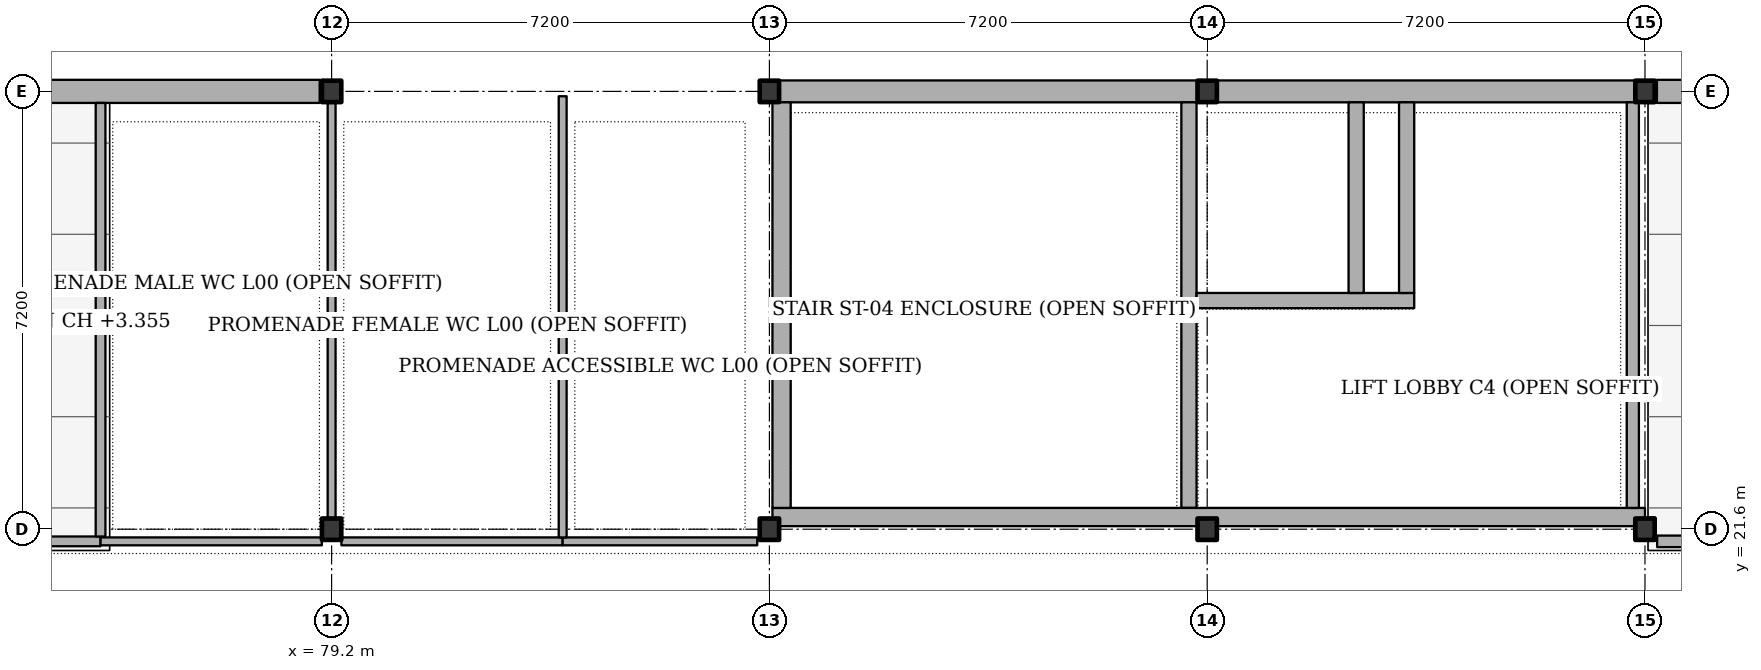
"""IFC4 building model, lengths in metres.
Left out: names, types, materials, properties, quantities, classifications, styles, units other than length and angle.
Written with IfcOpenShell. Run it as: python <this file> out.ifc"""

import sys

from ifc_helpers import new_model, si_unit, direction, frame, frame_2d, origin, origin_2d, place, context, subcontext, project, spatial, rectangle, i_section, extrude, element, fill, save


model = new_model("IFC4")
c1 = context("Model", 3, precision=1e-05, world=origin(), true_north=direction((0.0, 1.0)))
c2 = subcontext(c1, "Body", "Model", "MODEL_VIEW")
j1 = project(units=[si_unit("LENGTHUNIT", "METRE"), si_unit("PLANEANGLEUNIT", "RADIAN")], contexts=[c1])
p1 = place(None, origin())
s1 = spatial("IfcSite", under=j1, at=p1, CompositionType="ELEMENT")
p2 = place(p1, origin())
s2 = spatial("IfcBuilding", under=s1, at=p2, CompositionType="ELEMENT")
p3 = place(p2, origin())
s3 = spatial("IfcBuildingStorey", under=s2, at=p3, CompositionType="ELEMENT", Elevation=0.0)
for number, where, z_axis, x_axis in (
    (1, (79.2, 21.6, -0.3), (0.0, 0.0, 1.0), (1.0, 0.0, 0.0)),
    (2, (79.2, 28.8, -0.3), (0.0, 0.0, 1.0), (1.0, 0.0, 0.0)),
    (3, (86.4, 21.6, -0.3), (0.0, 0.0, 1.0), (1.0, 0.0, 0.0)),
    (4, (86.4, 28.8, -0.3), (0.0, 0.0, 1.0), (1.0, 0.0, 0.0)),
    (5, (93.6, 21.6, -0.3), (0.0, 0.0, 1.0), (1.0, 0.0, 0.0)),
    (6, (93.6, 28.8, -0.3), (0.0, 0.0, 1.0), (1.0, 0.0, 0.0)),
    (7, (100.8, 21.6, -0.3), (0.0, 0.0, 1.0), (1.0, 0.0, 0.0)),
    (8, (100.8, 28.8, -0.3), (0.0, 0.0, 1.0), (1.0, 0.0, 0.0)),
):
    element("IfcColumn", number, at=place(p3, frame(where, z_axis=z_axis, x_axis=x_axis)), inside=s3, PredefinedType="COLUMN", context=c2, shape_type="SweptSolid", body=[
        extrude(i_section(OverallWidth=0.318, OverallDepth=0.353, WebThickness=0.023, FlangeThickness=0.038, FilletRadius=0.015, at=origin_2d()), origin(), (0.0, 0.0, 1.0), 5.7),
    ])
p4 = place(p3, frame((72.196, 28.8, 0.0), z_axis=(0.0, 0.0, 1.0), x_axis=(1.0, 0.0, 0.0)))
e9 = element("IfcWall", 9, at=p4, inside=s3, PredefinedType="SOLIDWALL", context=c2, shape_type="SweptSolid", body=[
    extrude(rectangle(XDim=6.807, YDim=0.38, at=frame_2d((3.404, 0.0))), origin(), (0.0, 0.0, 1.0), 4.304),
])
p5 = place(p3, frame((86.4, 28.8, 0.0), z_axis=(0.0, 0.0, 1.0), x_axis=(1.0, 0.0, 0.0)))
e10 = element("IfcWall", 10, at=p5, inside=s3, PredefinedType="SHEAR", context=c2, shape_type="SweptSolid", body=[
    extrude(rectangle(XDim=7.2, YDim=0.36, at=frame_2d((3.6, 0.0))), origin(), (0.0, 0.0, 1.0), 4.505),
])
p6 = place(p5, frame((2.85, 0.0, 0.0)))
e11 = element("IfcOpeningElement", 11, at=p6, cuts=e10, PredefinedType="OPENING", context=c2, shape_type="SweptSolid", body=[
    extrude(rectangle(XDim=1.5, YDim=2.15, at=frame_2d((0.75, 1.075))), frame((0.0, 0.19, 0.0), z_axis=(0.0, -1.0, 0.0), x_axis=(1.0, 0.0, 0.0)), (0.0, 0.0, 1.0), 0.38),
])
p7 = place(p3, frame((93.6, 28.8, 0.0), z_axis=(0.0, 0.0, 1.0), x_axis=(1.0, 0.0, 0.0)))
e12 = element("IfcWall", 12, at=p7, inside=s3, PredefinedType="SHEAR", context=c2, shape_type="SweptSolid", body=[
    extrude(rectangle(XDim=7.2, YDim=0.36, at=frame_2d((3.6, 0.0))), origin(), (0.0, 0.0, 1.0), 4.355),
])
p8 = place(p3, frame((100.996, 28.8, 0.0), z_axis=(0.0, 0.0, 1.0), x_axis=(1.0, 0.0, 0.0)))
e13 = element("IfcWall", 13, at=p8, inside=s3, PredefinedType="SOLIDWALL", context=c2, shape_type="SweptSolid", body=[
    extrude(rectangle(XDim=6.807, YDim=0.38, at=frame_2d((3.404, 0.0))), origin(), (0.0, 0.0, 1.0), 4.355),
])
p9 = place(p8, frame((2.079, 0.0, 1.05)))
e14 = element("IfcOpeningElement", 14, at=p9, cuts=e13, PredefinedType="OPENING", context=c2, shape_type="SweptSolid", body=[
    extrude(rectangle(XDim=2.65, YDim=1.6, at=frame_2d((1.325, 0.8))), frame((0.0, 0.2, 0.0), z_axis=(0.0, -1.0, 0.0), x_axis=(1.0, 0.0, 0.0)), (0.0, 0.0, 1.0), 0.4),
])
p10 = place(p3, frame((93.3, 21.95, 0.0), z_axis=(0.0, 0.0, 1.0), x_axis=(0.0, 1.0, 0.0)))
e15 = element("IfcWall", 15, at=p10, inside=s3, PredefinedType="SHEAR", context=c2, shape_type="SweptSolid", body=[
    extrude(rectangle(XDim=6.67, YDim=0.25, at=frame_2d((3.335, 0.0))), origin(), (0.0, 0.0, 1.0), 4.45),
])
p11 = place(p10, frame((0.95, 0.0, 0.0)))
e16 = element("IfcOpeningElement", 16, at=p11, cuts=e15, PredefinedType="OPENING", context=c2, shape_type="SweptSolid", body=[
    extrude(rectangle(XDim=1.35, YDim=2.15, at=frame_2d((0.675, 1.075))), frame((0.0, 0.135, 0.0), z_axis=(0.0, -1.0, 0.0), x_axis=(1.0, 0.0, 0.0)), (0.0, 0.0, 1.0), 0.27),
])
p12 = place(p3, frame((93.425, 25.36, 0.0), z_axis=(0.0, 0.0, 1.0), x_axis=(1.0, 0.0, 0.0)))
e17 = element("IfcWall", 17, at=p12, inside=s3, PredefinedType="SHEAR", context=c2, shape_type="SweptSolid", body=[
    extrude(rectangle(XDim=3.58, YDim=0.25, at=frame_2d((1.79, 0.0))), origin(), (0.0, 0.0, 1.0), 4.45),
])
p13 = place(p12, frame((0.775, 0.0, 0.0)))
e18 = element("IfcOpeningElement", 18, at=p13, cuts=e17, PredefinedType="OPENING", context=c2, shape_type="SweptSolid", body=[
    extrude(rectangle(XDim=1.1, YDim=2.15, at=frame_2d((0.55, 1.075))), frame((0.0, 0.135, 0.0), z_axis=(0.0, -1.0, 0.0), x_axis=(1.0, 0.0, 0.0)), (0.0, 0.0, 1.0), 0.27),
])
p14 = place(p3, frame((96.05, 25.485, 0.0), z_axis=(0.0, 0.0, 1.0), x_axis=(0.0, 1.0, 0.0)))
e19 = element("IfcWall", 19, at=p14, inside=s3, PredefinedType="SHEAR", context=c2, shape_type="SweptSolid", body=[
    extrude(rectangle(XDim=3.135, YDim=0.25, at=frame_2d((1.567, 0.0))), origin(), (0.0, 0.0, 1.0), 4.45),
])
p15 = place(p3, frame((96.88, 25.485, 0.0), z_axis=(0.0, 0.0, 1.0), x_axis=(0.0, 1.0, 0.0)))
e20 = element("IfcWall", 20, at=p15, inside=s3, PredefinedType="SHEAR", context=c2, shape_type="SweptSolid", body=[
    extrude(rectangle(XDim=3.135, YDim=0.25, at=frame_2d((1.567, 0.0))), origin(), (0.0, 0.0, 1.0), 4.45),
])
p16 = place(p15, frame((0.9, 0.0, 0.0)))
e21 = element("IfcOpeningElement", 21, at=p16, cuts=e20, PredefinedType="OPENING", context=c2, shape_type="SweptSolid", body=[
    extrude(rectangle(XDim=0.92, YDim=2.05, at=frame_2d((0.46, 1.025))), frame((0.0, 0.135, 0.0), z_axis=(0.0, -1.0, 0.0), x_axis=(1.0, 0.0, 0.0)), (0.0, 0.0, 1.0), 0.27),
])
p17 = place(p3, frame((86.45, 21.8, 0.0), z_axis=(0.0, 0.0, 1.0), x_axis=(1.0, 0.0, 0.0)))
e22 = element("IfcWall", 22, at=p17, inside=s3, PredefinedType="SHEAR", context=c2, shape_type="SweptSolid", body=[
    extrude(rectangle(XDim=14.35, YDim=0.3, at=frame_2d((7.175, 0.0))), origin(), (0.0, 0.0, 1.0), 4.45),
])
p18 = place(p17, frame((11.5, 0.0, 0.0)))
e23 = element("IfcOpeningElement", 23, at=p18, cuts=e22, PredefinedType="OPENING", context=c2, shape_type="SweptSolid", body=[
    extrude(rectangle(XDim=1.5, YDim=2.15, at=frame_2d((0.75, 1.075))), frame((0.0, 0.16, 0.0), z_axis=(0.0, -1.0, 0.0), x_axis=(1.0, 0.0, 0.0)), (0.0, 0.0, 1.0), 0.32),
])
p19 = place(p3, frame((86.6, 21.95, 0.0), z_axis=(0.0, 0.0, 1.0), x_axis=(0.0, 1.0, 0.0)))
e24 = element("IfcWall", 24, at=p19, inside=s3, PredefinedType="SHEAR", context=c2, shape_type="SweptSolid", body=[
    extrude(rectangle(XDim=6.67, YDim=0.3, at=frame_2d((3.335, 0.0))), origin(), (0.0, 0.0, 1.0), 4.45),
])
p20 = place(p3, frame((100.6, 21.95, 0.0), z_axis=(0.0, 0.0, 1.0), x_axis=(0.0, 1.0, 0.0)))
e25 = element("IfcWall", 25, at=p20, inside=s3, PredefinedType="SOLIDWALL", context=c2, shape_type="SweptSolid", body=[
    extrude(rectangle(XDim=6.67, YDim=0.2, at=frame_2d((3.335, 0.0))), origin(), (0.0, 0.0, 1.0), 4.35),
])
p21 = place(p3, frame((72.161, 21.4, 0.0), z_axis=(0.0, 0.0, 1.0), x_axis=(1.0, 0.0, 0.0)))
e26 = element("IfcWall", 26, at=p21, inside=s3, PredefinedType="PARTITIONING", context=c2, shape_type="SweptSolid", body=[
    extrude(rectangle(XDim=3.239, YDim=0.16, at=frame_2d((1.62, 0.0))), origin(), (0.0, 0.0, 1.0), 3.55),
])
p22 = place(p3, frame((75.4, 21.4, 0.0), z_axis=(0.0, 0.0, 1.0), x_axis=(1.0, 0.0, 0.0)))
e27 = element("IfcWall", 27, at=p22, inside=s3, PredefinedType="PARTITIONING", context=c2, shape_type="SweptSolid", body=[
    extrude(rectangle(XDim=3.639, YDim=0.13, at=frame_2d((1.82, 0.0))), origin(), (0.0, 0.0, 1.0), 3.55),
])
p23 = place(p22, frame((0.32, 0.0, 0.0)))
e28 = element("IfcOpeningElement", 28, at=p23, cuts=e27, PredefinedType="OPENING", context=c2, shape_type="SweptSolid", body=[
    extrude(rectangle(XDim=0.9, YDim=2.05, at=frame_2d((0.45, 1.025))), frame((0.0, 0.075, 0.0), z_axis=(0.0, -1.0, 0.0), x_axis=(1.0, 0.0, 0.0)), (0.0, 0.0, 1.0), 0.15),
])
p24 = place(p3, frame((79.361, 21.4, 0.0), z_axis=(0.0, 0.0, 1.0), x_axis=(1.0, 0.0, 0.0)))
e29 = element("IfcWall", 29, at=p24, inside=s3, PredefinedType="PARTITIONING", context=c2, shape_type="SweptSolid", body=[
    extrude(rectangle(XDim=3.639, YDim=0.13, at=frame_2d((1.819, 0.0))), origin(), (0.0, 0.0, 1.0), 3.55),
])
p25 = place(p24, frame((2.419, 0.0, 0.0)))
e30 = element("IfcOpeningElement", 30, at=p25, cuts=e29, PredefinedType="OPENING", context=c2, shape_type="SweptSolid", body=[
    extrude(rectangle(XDim=0.9, YDim=2.05, at=frame_2d((0.45, 1.025))), frame((0.0, 0.075, 0.0), z_axis=(0.0, -1.0, 0.0), x_axis=(1.0, 0.0, 0.0)), (0.0, 0.0, 1.0), 0.15),
])
p26 = place(p3, frame((83.0, 21.4, 0.0), z_axis=(0.0, 0.0, 1.0), x_axis=(1.0, 0.0, 0.0)))
e31 = element("IfcWall", 31, at=p26, inside=s3, PredefinedType="PARTITIONING", context=c2, shape_type="SweptSolid", body=[
    extrude(rectangle(XDim=3.2, YDim=0.13, at=frame_2d((1.6, 0.0))), origin(), (0.0, 0.0, 1.0), 3.55),
])
p27 = place(p26, frame((0.32, 0.0, 0.0)))
e32 = element("IfcOpeningElement", 32, at=p27, cuts=e31, PredefinedType="OPENING", context=c2, shape_type="SweptSolid", body=[
    extrude(rectangle(XDim=0.98, YDim=2.1, at=frame_2d((0.49, 1.05))), frame((0.0, 0.075, 0.0), z_axis=(0.0, -1.0, 0.0), x_axis=(1.0, 0.0, 0.0)), (0.0, 0.0, 1.0), 0.15),
])
p28 = place(p3, frame((101.0, 21.4, 0.0), z_axis=(0.0, 0.0, 1.0), x_axis=(1.0, 0.0, 0.0)))
e33 = element("IfcWall", 33, at=p28, inside=s3, PredefinedType="PARTITIONING", context=c2, shape_type="SweptSolid", body=[
    extrude(rectangle(XDim=6.839, YDim=0.19, at=frame_2d((3.419, 0.0))), origin(), (0.0, 0.0, 1.0), 3.55),
])
p29 = place(p3, frame((75.4, 21.48, 0.0), z_axis=(0.0, 0.0, 1.0), x_axis=(0.0, 1.0, 0.0)))
e34 = element("IfcWall", 34, at=p29, inside=s3, PredefinedType="PARTITIONING", context=c2, shape_type="SweptSolid", body=[
    extrude(rectangle(XDim=7.13, YDim=0.16, at=frame_2d((3.565, 0.0))), origin(), (0.0, 0.0, 1.0), 3.55),
])
p30 = place(p3, frame((79.2, 21.778, 0.0), z_axis=(0.0, 0.0, 1.0), x_axis=(0.0, 1.0, 0.0)))
e35 = element("IfcWall", 35, at=p30, inside=s3, PredefinedType="PARTITIONING", context=c2, shape_type="SweptSolid", body=[
    extrude(rectangle(XDim=6.832, YDim=0.13, at=frame_2d((3.416, 0.0))), origin(), (0.0, 0.0, 1.0), 3.55),
])
p31 = place(p3, frame((83.0, 21.465, 0.0), z_axis=(0.0, 0.0, 1.0), x_axis=(0.0, 1.0, 0.0)))
e36 = element("IfcWall", 36, at=p31, inside=s3, PredefinedType="PARTITIONING", context=c2, shape_type="SweptSolid", body=[
    extrude(rectangle(XDim=7.255, YDim=0.13, at=frame_2d((3.627, 0.0))), origin(), (0.0, 0.0, 1.0), 3.55),
])
p32 = place(p6, origin())
e37 = element("IfcDoor", 37, at=p32, inside=s3, OperationType="SINGLE_SWING_RIGHT", PredefinedType="DOOR", context=c2, shape_type="SweptSolid", body=[
    extrude(rectangle(XDim=1.5, YDim=2.15, at=frame_2d((0.75, 1.075))), frame((0.0, 0.025, 0.0), z_axis=(0.0, -1.0, 0.0), x_axis=(1.0, 0.0, 0.0)), (0.0, 0.0, 1.0), 0.05),
])
fill(e11, e37)
p33 = place(p11, origin())
e38 = element("IfcDoor", 38, at=p33, inside=s3, OperationType="SINGLE_SWING_RIGHT", PredefinedType="DOOR", context=c2, shape_type="SweptSolid", body=[
    extrude(rectangle(XDim=1.35, YDim=2.15, at=frame_2d((0.675, 1.075))), frame((0.0, 0.025, 0.0), z_axis=(0.0, -1.0, 0.0), x_axis=(1.0, 0.0, 0.0)), (0.0, 0.0, 1.0), 0.05),
])
fill(e16, e38)
p34 = place(p13, origin())
e39 = element("IfcDoor", 39, at=p34, inside=s3, OperationType="SLIDING_TO_LEFT", PredefinedType="DOOR", context=c2, shape_type="SweptSolid", body=[
    extrude(rectangle(XDim=1.1, YDim=2.15, at=frame_2d((0.55, 1.075))), frame((0.0, 0.025, 0.0), z_axis=(0.0, -1.0, 0.0), x_axis=(1.0, 0.0, 0.0)), (0.0, 0.0, 1.0), 0.05),
])
fill(e18, e39)
p35 = place(p16, origin())
e40 = element("IfcDoor", 40, at=p35, inside=s3, OperationType="SINGLE_SWING_LEFT", PredefinedType="DOOR", context=c2, shape_type="SweptSolid", body=[
    extrude(rectangle(XDim=0.92, YDim=2.05, at=frame_2d((0.46, 1.025))), frame((0.0, 0.025, 0.0), z_axis=(0.0, -1.0, 0.0), x_axis=(1.0, 0.0, 0.0)), (0.0, 0.0, 1.0), 0.05),
])
fill(e21, e40)
p36 = place(p18, origin())
e41 = element("IfcDoor", 41, at=p36, inside=s3, OperationType="SINGLE_SWING_RIGHT", PredefinedType="DOOR", context=c2, shape_type="SweptSolid", body=[
    extrude(rectangle(XDim=1.5, YDim=2.15, at=frame_2d((0.75, 1.075))), frame((0.0, 0.025, 0.0), z_axis=(0.0, -1.0, 0.0), x_axis=(1.0, 0.0, 0.0)), (0.0, 0.0, 1.0), 0.05),
])
fill(e23, e41)
p37 = place(p23, origin())
e42 = element("IfcDoor", 42, at=p37, inside=s3, OperationType="SINGLE_SWING_LEFT", PredefinedType="DOOR", context=c2, shape_type="SweptSolid", body=[
    extrude(rectangle(XDim=0.9, YDim=2.05, at=frame_2d((0.45, 1.025))), frame((0.0, 0.025, 0.0), z_axis=(0.0, -1.0, 0.0), x_axis=(1.0, 0.0, 0.0)), (0.0, 0.0, 1.0), 0.05),
])
fill(e28, e42)
p38 = place(p25, origin())
e43 = element("IfcDoor", 43, at=p38, inside=s3, OperationType="SINGLE_SWING_RIGHT", PredefinedType="DOOR", context=c2, shape_type="SweptSolid", body=[
    extrude(rectangle(XDim=0.9, YDim=2.05, at=frame_2d((0.45, 1.025))), frame((0.0, 0.025, 0.0), z_axis=(0.0, -1.0, 0.0), x_axis=(1.0, 0.0, 0.0)), (0.0, 0.0, 1.0), 0.05),
])
fill(e30, e43)
p39 = place(p27, origin())
e44 = element("IfcDoor", 44, at=p39, inside=s3, OperationType="SINGLE_SWING_LEFT", PredefinedType="DOOR", context=c2, shape_type="SweptSolid", body=[
    extrude(rectangle(XDim=0.98, YDim=2.1, at=frame_2d((0.49, 1.05))), frame((0.0, 0.025, 0.0), z_axis=(0.0, -1.0, 0.0), x_axis=(1.0, 0.0, 0.0)), (0.0, 0.0, 1.0), 0.05),
])
fill(e32, e44)
save(model, sys.argv[1])
